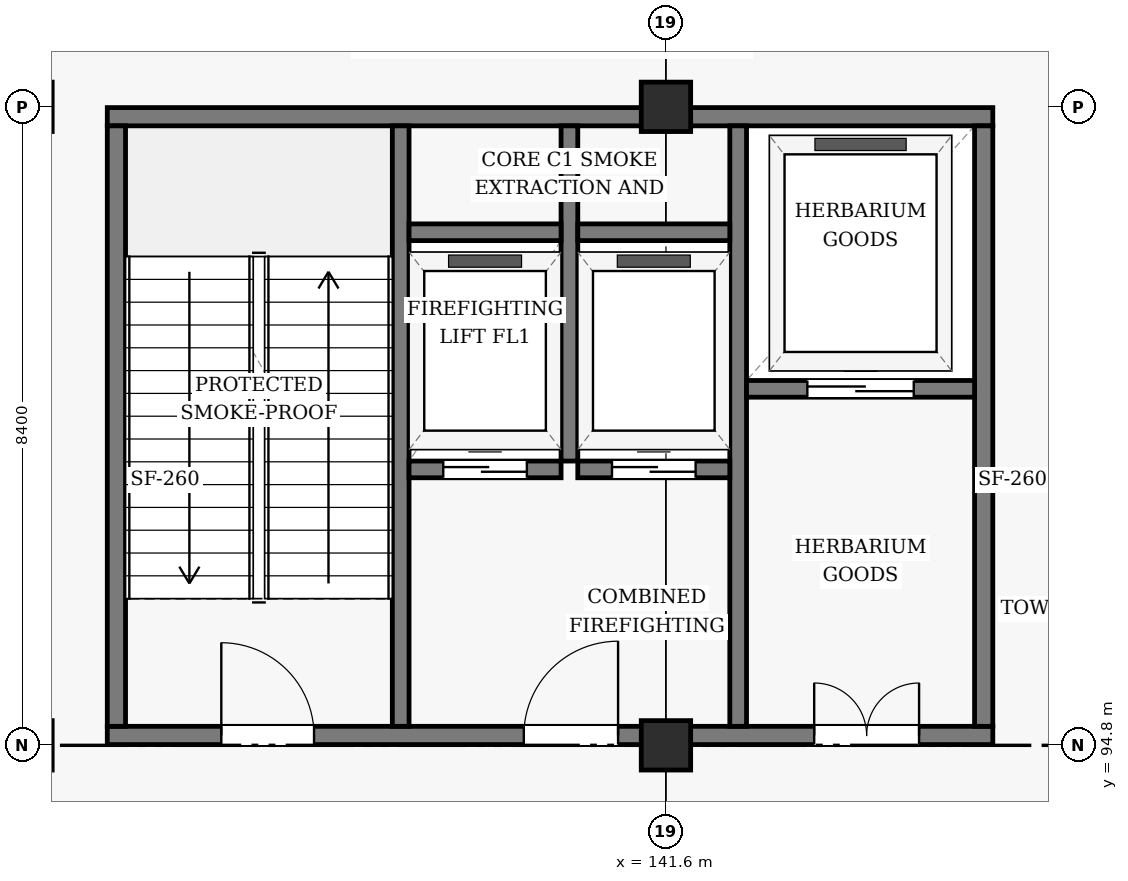
"""IFC4 building model, lengths in metres.
Left out: names, types, materials, properties, quantities, classifications, styles, units other than length and angle.
Written with IfcOpenShell. Run it as: python <this file> out.ifc"""

import sys

from ifc_helpers import new_model, si_unit, direction, frame, frame_2d, origin, origin_2d, place, context, subcontext, project, spatial, rectangle, hollow_rectangle, extrude, element, fill, save


model = new_model("IFC4")
c1 = context("Model", 3, precision=1e-05, world=origin(), true_north=direction((0.0, 1.0)))
c2 = subcontext(c1, "Body", "Model", "MODEL_VIEW")
j1 = project(units=[si_unit("LENGTHUNIT", "METRE"), si_unit("PLANEANGLEUNIT", "RADIAN")], contexts=[c1])
p1 = place(None, origin())
s1 = spatial("IfcSite", under=j1, at=p1, CompositionType="ELEMENT")
p2 = place(p1, origin())
s2 = spatial("IfcBuilding", under=s1, at=p2, CompositionType="ELEMENT")
p3 = place(p2, origin())
s3 = spatial("IfcBuildingStorey", under=s2, at=p3, CompositionType="ELEMENT", Elevation=0.0)
for number, where, z_axis, x_axis in (
    (1, (141.6, 94.8, 0.0), (0.0, 0.0, 1.0), (1.0, 0.0, 0.0)),
    (2, (141.6, 103.2, 0.0), (0.0, 0.0, 1.0), (1.0, 0.0, 0.0)),
):
    element("IfcColumn", number, at=place(p3, frame(where, z_axis=z_axis, x_axis=x_axis)), inside=s3, PredefinedType="COLUMN", context=c2, shape_type="SweptSolid", body=[
        extrude(hollow_rectangle(XDim=0.65, YDim=0.65, WallThickness=0.028, InnerFilletRadius=0.028, OuterFilletRadius=0.056, at=origin_2d()), origin(), (0.0, 0.0, 1.0), 4.8),
    ])
p4 = place(p3, frame((134.25, 94.93, 0.0), z_axis=(0.0, 0.0, 1.0), x_axis=(1.0, 0.0, 0.0)))
e3 = element("IfcWall", 3, at=p4, inside=s3, PredefinedType="SHEAR", context=c2, shape_type="SweptSolid", body=[
    extrude(rectangle(XDim=11.65, YDim=0.24, at=frame_2d((5.825, 0.0))), origin(), (0.0, 0.0, 1.0), 4.56),
])
p5 = place(p4, frame((1.5, 0.0, 0.0)))
e4 = element("IfcOpeningElement", 4, at=p5, cuts=e3, PredefinedType="OPENING", context=c2, shape_type="SweptSolid", body=[
    extrude(rectangle(XDim=1.22, YDim=2.18, at=frame_2d((0.61, 1.09))), frame((0.0, 0.13, 0.0), z_axis=(0.0, -1.0, 0.0), x_axis=(1.0, 0.0, 0.0)), (0.0, 0.0, 1.0), 0.26),
])
p6 = place(p4, frame((5.48, 0.0, 0.0)))
e5 = element("IfcOpeningElement", 5, at=p6, cuts=e3, PredefinedType="OPENING", context=c2, shape_type="SweptSolid", body=[
    extrude(rectangle(XDim=1.24, YDim=2.15, at=frame_2d((0.62, 1.075))), frame((0.0, 0.13, 0.0), z_axis=(0.0, -1.0, 0.0), x_axis=(1.0, 0.0, 0.0)), (0.0, 0.0, 1.0), 0.26),
])
p7 = place(p4, frame((9.3, 0.0, 0.0)))
e6 = element("IfcOpeningElement", 6, at=p7, cuts=e3, PredefinedType="OPENING", context=c2, shape_type="SweptSolid", body=[
    extrude(rectangle(XDim=1.38, YDim=2.15, at=frame_2d((0.69, 1.075))), frame((0.0, 0.13, 0.0), z_axis=(0.0, -1.0, 0.0), x_axis=(1.0, 0.0, 0.0)), (0.0, 0.0, 1.0), 0.26),
])
p8 = place(p3, frame((134.25, 103.07, 0.0), z_axis=(0.0, 0.0, 1.0), x_axis=(1.0, 0.0, 0.0)))
e7 = element("IfcWall", 7, at=p8, inside=s3, PredefinedType="SHEAR", context=c2, shape_type="SweptSolid", body=[
    extrude(rectangle(XDim=11.65, YDim=0.24, at=frame_2d((5.825, 0.0))), origin(), (0.0, 0.0, 1.0), 4.56),
])
p9 = place(p3, frame((134.37, 95.05, 0.0), z_axis=(0.0, 0.0, 1.0), x_axis=(0.0, 1.0, 0.0)))
e8 = element("IfcWall", 8, at=p9, inside=s3, PredefinedType="SHEAR", context=c2, shape_type="SweptSolid", body=[
    extrude(rectangle(XDim=7.9, YDim=0.24, at=frame_2d((3.95, 0.0))), origin(), (0.0, 0.0, 1.0), 4.56),
])
p10 = place(p3, frame((138.11, 95.05, 0.0), z_axis=(0.0, 0.0, 1.0), x_axis=(0.0, 1.0, 0.0)))
e9 = element("IfcWall", 9, at=p10, inside=s3, PredefinedType="SHEAR", context=c2, shape_type="SweptSolid", body=[
    extrude(rectangle(XDim=7.9, YDim=0.22, at=frame_2d((3.95, 0.0))), origin(), (0.0, 0.0, 1.0), 4.56),
])
p11 = place(p3, frame((140.33, 98.54, 0.0), z_axis=(0.0, 0.0, 1.0), x_axis=(0.0, 1.0, 0.0)))
e10 = element("IfcWall", 10, at=p11, inside=s3, PredefinedType="SHEAR", context=c2, shape_type="SweptSolid", body=[
    extrude(rectangle(XDim=4.41, YDim=0.22, at=frame_2d((2.205, 0.0))), origin(), (0.0, 0.0, 1.0), 4.56),
])
p12 = place(p3, frame((142.55, 95.05, 0.0), z_axis=(0.0, 0.0, 1.0), x_axis=(0.0, 1.0, 0.0)))
e11 = element("IfcWall", 11, at=p12, inside=s3, PredefinedType="SHEAR", context=c2, shape_type="SweptSolid", body=[
    extrude(rectangle(XDim=7.9, YDim=0.22, at=frame_2d((3.95, 0.0))), origin(), (0.0, 0.0, 1.0), 4.56),
])
p13 = place(p3, frame((145.78, 95.05, 0.0), z_axis=(0.0, 0.0, 1.0), x_axis=(0.0, 1.0, 0.0)))
e12 = element("IfcWall", 12, at=p13, inside=s3, PredefinedType="SHEAR", context=c2, shape_type="SweptSolid", body=[
    extrude(rectangle(XDim=7.9, YDim=0.24, at=frame_2d((3.95, 0.0))), origin(), (0.0, 0.0, 1.0), 4.56),
])
p14 = place(p3, frame((138.22, 98.43, 0.0), z_axis=(0.0, 0.0, 1.0), x_axis=(1.0, 0.0, 0.0)))
e13 = element("IfcWall", 13, at=p14, inside=s3, PredefinedType="SHEAR", context=c2, shape_type="SweptSolid", body=[
    extrude(rectangle(XDim=2.0, YDim=0.22, at=frame_2d((1.0, 0.0))), origin(), (0.0, 0.0, 1.0), 4.56),
])
p15 = place(p14, frame((0.45, 0.0, 0.0)))
e14 = element("IfcOpeningElement", 14, at=p15, cuts=e13, PredefinedType="OPENING", context=c2, shape_type="SweptSolid", body=[
    extrude(rectangle(XDim=1.1, YDim=2.15, at=frame_2d((0.55, 1.075))), frame((0.0, 0.12, 0.0), z_axis=(0.0, -1.0, 0.0), x_axis=(1.0, 0.0, 0.0)), (0.0, 0.0, 1.0), 0.24),
])
p16 = place(p3, frame((140.44, 98.43, 0.0), z_axis=(0.0, 0.0, 1.0), x_axis=(1.0, 0.0, 0.0)))
e15 = element("IfcWall", 15, at=p16, inside=s3, PredefinedType="SHEAR", context=c2, shape_type="SweptSolid", body=[
    extrude(rectangle(XDim=2.0, YDim=0.22, at=frame_2d((1.0, 0.0))), origin(), (0.0, 0.0, 1.0), 4.56),
])
p17 = place(p16, frame((0.45, 0.0, 0.0)))
e16 = element("IfcOpeningElement", 16, at=p17, cuts=e15, PredefinedType="OPENING", context=c2, shape_type="SweptSolid", body=[
    extrude(rectangle(XDim=1.1, YDim=2.15, at=frame_2d((0.55, 1.075))), frame((0.0, 0.12, 0.0), z_axis=(0.0, -1.0, 0.0), x_axis=(1.0, 0.0, 0.0)), (0.0, 0.0, 1.0), 0.24),
])
for number, where, z_axis, x_axis in (
    (17, (138.22, 101.55, 0.0), (0.0, 0.0, 1.0), (1.0, 0.0, 0.0)),
    (18, (140.44, 101.55, 0.0), (0.0, 0.0, 1.0), (1.0, 0.0, 0.0)),
):
    element("IfcWall", number, at=place(p3, frame(where, z_axis=z_axis, x_axis=x_axis)), inside=s3, PredefinedType="SHEAR", context=c2, shape_type="SweptSolid", body=[
        extrude(rectangle(XDim=2.0, YDim=0.22, at=frame_2d((1.0, 0.0))), origin(), (0.0, 0.0, 1.0), 4.56),
    ])
p18 = place(p3, frame((142.66, 99.49, 0.0), z_axis=(0.0, 0.0, 1.0), x_axis=(1.0, 0.0, 0.0)))
e19 = element("IfcWall", 19, at=p18, inside=s3, PredefinedType="SHEAR", context=c2, shape_type="SweptSolid", body=[
    extrude(rectangle(XDim=3.0, YDim=0.22, at=frame_2d((1.5, 0.0))), origin(), (0.0, 0.0, 1.0), 4.56),
])
p19 = place(p18, frame((0.8, 0.0, 0.0)))
e20 = element("IfcOpeningElement", 20, at=p19, cuts=e19, PredefinedType="OPENING", context=c2, shape_type="SweptSolid", body=[
    extrude(rectangle(XDim=1.4, YDim=2.2, at=frame_2d((0.7, 1.1))), frame((0.0, 0.12, 0.0), z_axis=(0.0, -1.0, 0.0), x_axis=(1.0, 0.0, 0.0)), (0.0, 0.0, 1.0), 0.24),
])
p20 = place(p5, origin())
e21 = element("IfcDoor", 21, at=p20, inside=s3, OperationType="SINGLE_SWING_LEFT", PredefinedType="DOOR", context=c2, shape_type="SweptSolid", body=[
    extrude(rectangle(XDim=1.22, YDim=2.18, at=frame_2d((0.61, 1.09))), frame((0.0, 0.025, 0.0), z_axis=(0.0, -1.0, 0.0), x_axis=(1.0, 0.0, 0.0)), (0.0, 0.0, 1.0), 0.05),
])
fill(e4, e21)
p21 = place(p6, frame((1.24, 0.0, 0.0), z_axis=(0.0, 0.0, 1.0), x_axis=(-1.0, 0.0, 0.0)))
e22 = element("IfcDoor", 22, at=p21, inside=s3, OperationType="SINGLE_SWING_RIGHT", PredefinedType="DOOR", context=c2, shape_type="SweptSolid", body=[
    extrude(rectangle(XDim=1.24, YDim=2.15, at=frame_2d((0.62, 1.075))), frame((0.0, 0.025, 0.0), z_axis=(0.0, -1.0, 0.0), x_axis=(1.0, 0.0, 0.0)), (0.0, 0.0, 1.0), 0.05),
])
fill(e5, e22)
p22 = place(p7, frame((1.38, 0.0, 0.0), z_axis=(0.0, 0.0, 1.0), x_axis=(-1.0, 0.0, 0.0)))
e23 = element("IfcDoor", 23, at=p22, inside=s3, OperationType="DOUBLE_DOOR_SINGLE_SWING", PredefinedType="DOOR", context=c2, shape_type="SweptSolid", body=[
    extrude(rectangle(XDim=1.38, YDim=2.15, at=frame_2d((0.69, 1.075))), frame((0.0, 0.025, 0.0), z_axis=(0.0, -1.0, 0.0), x_axis=(1.0, 0.0, 0.0)), (0.0, 0.0, 1.0), 0.05),
])
fill(e6, e23)
p23 = place(p15, origin())
e24 = element("IfcDoor", 24, at=p23, inside=s3, OperationType="SLIDING_TO_LEFT", PredefinedType="DOOR", context=c2, shape_type="SweptSolid", body=[
    extrude(rectangle(XDim=1.1, YDim=2.15, at=frame_2d((0.55, 1.075))), frame((0.0, 0.025, 0.0), z_axis=(0.0, -1.0, 0.0), x_axis=(1.0, 0.0, 0.0)), (0.0, 0.0, 1.0), 0.05),
])
fill(e14, e24)
p24 = place(p17, origin())
e25 = element("IfcDoor", 25, at=p24, inside=s3, OperationType="SLIDING_TO_LEFT", PredefinedType="DOOR", context=c2, shape_type="SweptSolid", body=[
    extrude(rectangle(XDim=1.1, YDim=2.15, at=frame_2d((0.55, 1.075))), frame((0.0, 0.025, 0.0), z_axis=(0.0, -1.0, 0.0), x_axis=(1.0, 0.0, 0.0)), (0.0, 0.0, 1.0), 0.05),
])
fill(e16, e25)
p25 = place(p19, origin())
e26 = element("IfcDoor", 26, at=p25, inside=s3, OperationType="SLIDING_TO_LEFT", PredefinedType="DOOR", context=c2, shape_type="SweptSolid", body=[
    extrude(rectangle(XDim=1.4, YDim=2.2, at=frame_2d((0.7, 1.1))), frame((0.0, 0.025, 0.0), z_axis=(0.0, -1.0, 0.0), x_axis=(1.0, 0.0, 0.0)), (0.0, 0.0, 1.0), 0.05),
])
fill(e20, e26)
save(model, sys.argv[1])
